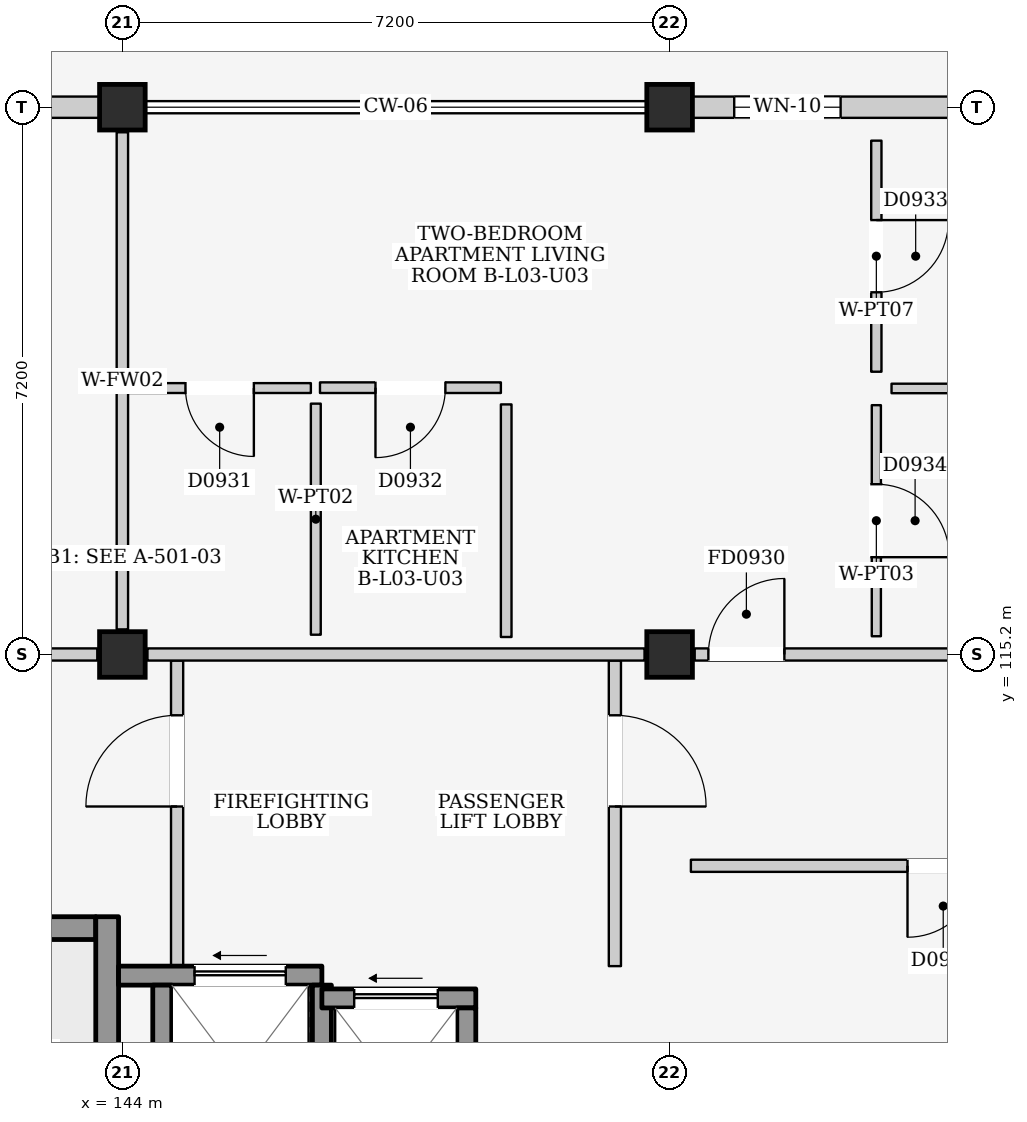
"""IFC4 building model, lengths in metres.
Left out: names, types, materials, properties, quantities, classifications, styles, units other than length and angle.
Written with IfcOpenShell. Run it as: python <this file> out.ifc"""

import sys

from ifc_helpers import new_model, si_unit, direction, frame, frame_2d, origin, origin_2d, place, context, subcontext, project, spatial, rectangle, extrude, element, fill, save


model = new_model("IFC4")
c1 = context("Model", 3, precision=1e-05, world=origin(), true_north=direction((0.0, 1.0)))
c2 = subcontext(c1, "Body", "Model", "MODEL_VIEW")
j1 = project(units=[si_unit("LENGTHUNIT", "METRE"), si_unit("PLANEANGLEUNIT", "RADIAN")], contexts=[c1])
p1 = place(None, origin())
s1 = spatial("IfcSite", under=j1, at=p1, CompositionType="ELEMENT")
p2 = place(p1, origin())
s2 = spatial("IfcBuilding", under=s1, at=p2, CompositionType="ELEMENT")
p3 = place(p2, frame((0.0, 0.0, 12.2)))
s3 = spatial("IfcBuildingStorey", under=s2, at=p3, CompositionType="ELEMENT", Elevation=12.2)
for number, where, z_axis, x_axis in (
    (1, (144.0, 115.2, 0.0), (0.0, 0.0, 1.0), (1.0, 0.0, 0.0)),
    (2, (144.0, 122.4, 0.0), (0.0, 0.0, 1.0), (1.0, 0.0, 0.0)),
    (3, (151.2, 115.2, 0.0), (0.0, 0.0, 1.0), (1.0, 0.0, 0.0)),
    (4, (151.2, 122.4, 0.0), (0.0, 0.0, 1.0), (1.0, 0.0, 0.0)),
):
    element("IfcColumn", number, at=place(p3, frame(where, z_axis=z_axis, x_axis=x_axis)), inside=s3, PredefinedType="COLUMN", context=c2, shape_type="SweptSolid", body=[
        extrude(rectangle(XDim=0.6, YDim=0.6, at=origin_2d()), origin(), (0.0, 0.0, 1.0), 3.2),
    ])
p4 = place(p3, frame((137.1, 122.4, 0.0), z_axis=(0.0, 0.0, 1.0), x_axis=(1.0, 0.0, 0.0)))
e5 = element("IfcWall", 5, at=p4, inside=s3, PredefinedType="ELEMENTEDWALL", context=c2, shape_type="SweptSolid", body=[
    extrude(rectangle(XDim=6.6, YDim=0.28, at=frame_2d((3.3, 0.0))), origin(), (0.0, 0.0, 1.0), 2.445),
])
p5 = place(p4, frame((3.85, 0.0, 0.0)))
e6 = element("IfcOpeningElement", 6, at=p5, cuts=e5, PredefinedType="OPENING", context=c2, shape_type="SweptSolid", body=[
    extrude(rectangle(XDim=1.4, YDim=2.1, at=frame_2d((0.7, 1.05))), frame((0.0, 0.155, 0.0), z_axis=(0.0, -1.0, 0.0), x_axis=(1.0, 0.0, 0.0)), (0.0, 0.0, 1.0), 0.31),
])
p6 = place(p4, frame((0.55, 0.0, 0.685)))
e7 = element("IfcOpeningElement", 7, at=p6, cuts=e5, PredefinedType="OPENING", context=c2, shape_type="SweptSolid", body=[
    extrude(rectangle(XDim=2.4, YDim=1.65, at=frame_2d((1.2, 0.825))), frame((0.0, 0.155, 0.0), z_axis=(0.0, -1.0, 0.0), x_axis=(1.0, 0.0, 0.0)), (0.0, 0.0, 1.0), 0.31),
])
p7 = place(p3, frame((151.5, 122.4, 0.0), z_axis=(0.0, 0.0, 1.0), x_axis=(1.0, 0.0, 0.0)))
e8 = element("IfcWall", 8, at=p7, inside=s3, PredefinedType="ELEMENTEDWALL", context=c2, shape_type="SweptSolid", body=[
    extrude(rectangle(XDim=6.6, YDim=0.28, at=frame_2d((3.3, 0.0))), origin(), (0.0, 0.0, 1.0), 2.445),
])
p8 = place(p7, frame((3.85, 0.0, 0.0)))
e9 = element("IfcOpeningElement", 9, at=p8, cuts=e8, PredefinedType="OPENING", context=c2, shape_type="SweptSolid", body=[
    extrude(rectangle(XDim=1.6, YDim=2.12, at=frame_2d((0.8, 1.06))), frame((0.0, 0.155, 0.0), z_axis=(0.0, -1.0, 0.0), x_axis=(1.0, 0.0, 0.0)), (0.0, 0.0, 1.0), 0.31),
])
p9 = place(p7, frame((0.55, 0.0, 0.9)))
e10 = element("IfcOpeningElement", 10, at=p9, cuts=e8, PredefinedType="OPENING", context=c2, shape_type="SweptSolid", body=[
    extrude(rectangle(XDim=1.4, YDim=1.2, at=frame_2d((0.7, 0.6))), frame((0.0, 0.155, 0.0), z_axis=(0.0, -1.0, 0.0), x_axis=(1.0, 0.0, 0.0)), (0.0, 0.0, 1.0), 0.31),
])
p10 = place(p3, frame((137.15, 111.6, 0.0), z_axis=(0.0, 0.0, 1.0), x_axis=(1.0, 0.0, 0.0)))
e11 = element("IfcWall", 11, at=p10, inside=s3, PredefinedType="SHEAR", context=c2, shape_type="SweptSolid", body=[
    extrude(rectangle(XDim=6.5, YDim=0.3, at=frame_2d((3.25, 0.0))), origin(), (0.0, 0.0, 1.0), 2.98),
])
p11 = place(p10, frame((0.18, 0.0, 0.0)))
e12 = element("IfcOpeningElement", 12, at=p11, cuts=e11, PredefinedType="OPENING", context=c2, shape_type="SweptSolid", body=[
    extrude(rectangle(XDim=1.15, YDim=2.2, at=frame_2d((0.575, 1.1))), frame((0.0, 0.165, 0.0), z_axis=(0.0, -1.0, 0.0), x_axis=(1.0, 0.0, 0.0)), (0.0, 0.0, 1.0), 0.33),
])
p12 = place(p3, frame((143.8, 108.15, 0.0), z_axis=(0.0, 0.0, 1.0), x_axis=(0.0, 1.0, 0.0)))
e13 = element("IfcWall", 13, at=p12, inside=s3, PredefinedType="SHEAR", context=c2, shape_type="SweptSolid", body=[
    extrude(rectangle(XDim=3.6, YDim=0.3, at=frame_2d((1.8, 0.0))), origin(), (0.0, 0.0, 1.0), 2.98),
])
p13 = place(p3, frame((144.72, 111.1, 0.0), z_axis=(0.0, 0.0, 1.0), x_axis=(0.0, 1.0, 0.0)))
e14 = element("IfcWall", 14, at=p13, inside=s3, PredefinedType="PARTITIONING", context=c2, shape_type="SweptSolid", body=[
    extrude(rectangle(XDim=4.02, YDim=0.16, at=frame_2d((2.01, 0.0))), origin(), (0.0, 0.0, 1.0), 2.98),
])
p14 = place(p13, frame((2.1, 0.0, 0.0)))
e15 = element("IfcOpeningElement", 15, at=p14, cuts=e14, PredefinedType="OPENING", context=c2, shape_type="SweptSolid", body=[
    extrude(rectangle(XDim=1.2, YDim=2.2, at=frame_2d((0.6, 1.1))), frame((0.0, 0.095, 0.0), z_axis=(0.0, -1.0, 0.0), x_axis=(1.0, 0.0, 0.0)), (0.0, 0.0, 1.0), 0.19),
])
p15 = place(p3, frame((150.48, 111.1, 0.0), z_axis=(0.0, 0.0, 1.0), x_axis=(0.0, 1.0, 0.0)))
e16 = element("IfcWall", 16, at=p15, inside=s3, PredefinedType="PARTITIONING", context=c2, shape_type="SweptSolid", body=[
    extrude(rectangle(XDim=4.02, YDim=0.16, at=frame_2d((2.01, 0.0))), origin(), (0.0, 0.0, 1.0), 2.98),
])
p16 = place(p15, frame((2.1, 0.0, 0.0)))
e17 = element("IfcOpeningElement", 17, at=p16, cuts=e16, PredefinedType="OPENING", context=c2, shape_type="SweptSolid", body=[
    extrude(rectangle(XDim=1.2, YDim=2.2, at=frame_2d((0.6, 1.1))), frame((0.0, 0.095, 0.0), z_axis=(0.0, -1.0, 0.0), x_axis=(1.0, 0.0, 0.0)), (0.0, 0.0, 1.0), 0.19),
])
p17 = place(p3, frame((143.95, 110.975, 0.0), z_axis=(0.0, 0.0, 1.0), x_axis=(1.0, 0.0, 0.0)))
e18 = element("IfcWall", 18, at=p17, inside=s3, PredefinedType="SHEAR", context=c2, shape_type="SweptSolid", body=[
    extrude(rectangle(XDim=2.675, YDim=0.25, at=frame_2d((1.337, 0.0))), origin(), (0.0, 0.0, 1.0), 2.98),
])
p18 = place(p17, frame((1.0, 0.0, 0.0)))
e19 = element("IfcOpeningElement", 19, at=p18, cuts=e18, PredefinedType="OPENING", context=c2, shape_type="SweptSolid", body=[
    extrude(rectangle(XDim=1.2, YDim=2.25, at=frame_2d((0.6, 1.125))), frame((0.0, 0.14, 0.0), z_axis=(0.0, -1.0, 0.0), x_axis=(1.0, 0.0, 0.0)), (0.0, 0.0, 1.0), 0.28),
])
for number, where, z_axis, x_axis in (
    (20, (144.525, 108.45, 0.0), (0.0, 0.0, 1.0), (0.0, 1.0, 0.0)),
    (21, (146.625, 108.45, 0.0), (0.0, 0.0, 1.0), (0.0, 1.0, 0.0)),
):
    element("IfcWall", number, at=place(p3, frame(where, z_axis=z_axis, x_axis=x_axis)), inside=s3, PredefinedType="SHEAR", context=c2, shape_type="SweptSolid", body=[
        extrude(rectangle(XDim=2.4, YDim=0.25, at=frame_2d((1.2, 0.0))), origin(), (0.0, 0.0, 1.0), 2.98),
    ])
p19 = place(p3, frame((146.625, 110.675, 0.0), z_axis=(0.0, 0.0, 1.0), x_axis=(1.0, 0.0, 0.0)))
e22 = element("IfcWall", 22, at=p19, inside=s3, PredefinedType="SHEAR", context=c2, shape_type="SweptSolid", body=[
    extrude(rectangle(XDim=2.025, YDim=0.25, at=frame_2d((1.012, 0.0))), origin(), (0.0, 0.0, 1.0), 2.98),
])
p20 = place(p19, frame((0.425, 0.0, 0.0)))
e23 = element("IfcOpeningElement", 23, at=p20, cuts=e22, PredefinedType="OPENING", context=c2, shape_type="SweptSolid", body=[
    extrude(rectangle(XDim=1.1, YDim=2.15, at=frame_2d((0.55, 1.075))), frame((0.0, 0.14, 0.0), z_axis=(0.0, -1.0, 0.0), x_axis=(1.0, 0.0, 0.0)), (0.0, 0.0, 1.0), 0.28),
])
p21 = place(p3, frame((148.525, 108.45, 0.0), z_axis=(0.0, 0.0, 1.0), x_axis=(0.0, 1.0, 0.0)))
e24 = element("IfcWall", 24, at=p21, inside=s3, PredefinedType="SHEAR", context=c2, shape_type="SweptSolid", body=[
    extrude(rectangle(XDim=2.1, YDim=0.25, at=frame_2d((1.05, 0.0))), origin(), (0.0, 0.0, 1.0), 2.98),
])
p22 = place(p3, frame((137.13, 115.2, 0.0), z_axis=(0.0, 0.0, 1.0), x_axis=(1.0, 0.0, 0.0)))
e25 = element("IfcWall", 25, at=p22, inside=s3, PredefinedType="PARTITIONING", context=c2, shape_type="SweptSolid", body=[
    extrude(rectangle(XDim=6.54, YDim=0.16, at=frame_2d((3.27, 0.0))), origin(), (0.0, 0.0, 1.0), 2.365),
])
p23 = place(p22, frame((4.12, 0.0, 0.0)))
e26 = element("IfcOpeningElement", 26, at=p23, cuts=e25, PredefinedType="OPENING", context=c2, shape_type="SweptSolid", body=[
    extrude(rectangle(XDim=1.0, YDim=2.15, at=frame_2d((0.5, 1.075))), frame((0.0, 0.095, 0.0), z_axis=(0.0, -1.0, 0.0), x_axis=(1.0, 0.0, 0.0)), (0.0, 0.0, 1.0), 0.19),
])
p24 = place(p3, frame((144.0, 115.53, 0.0), z_axis=(0.0, 0.0, 1.0), x_axis=(0.0, 1.0, 0.0)))
e27 = element("IfcWall", 27, at=p24, inside=s3, PredefinedType="PARTITIONING", context=c2, shape_type="SweptSolid", body=[
    extrude(rectangle(XDim=6.54, YDim=0.15, at=frame_2d((3.27, 0.0))), origin(), (0.0, 0.0, 1.0), 2.415),
])
p25 = place(p3, frame((144.33, 115.2, 0.0), z_axis=(0.0, 0.0, 1.0), x_axis=(1.0, 0.0, 0.0)))
e28 = element("IfcWall", 28, at=p25, inside=s3, PredefinedType="PARTITIONING", context=c2, shape_type="SweptSolid", body=[
    extrude(rectangle(XDim=6.54, YDim=0.16, at=frame_2d((3.27, 0.0))), origin(), (0.0, 0.0, 1.0), 2.365),
])
p26 = place(p3, frame((151.53, 115.2, 0.0), z_axis=(0.0, 0.0, 1.0), x_axis=(1.0, 0.0, 0.0)))
e29 = element("IfcWall", 29, at=p26, inside=s3, PredefinedType="PARTITIONING", context=c2, shape_type="SweptSolid", body=[
    extrude(rectangle(XDim=6.54, YDim=0.16, at=frame_2d((3.27, 0.0))), origin(), (0.0, 0.0, 1.0), 2.365),
])
p27 = place(p26, frame((0.18, 0.0, 0.0)))
e30 = element("IfcOpeningElement", 30, at=p27, cuts=e29, PredefinedType="OPENING", context=c2, shape_type="SweptSolid", body=[
    extrude(rectangle(XDim=1.0, YDim=2.15, at=frame_2d((0.5, 1.075))), frame((0.0, 0.095, 0.0), z_axis=(0.0, -1.0, 0.0), x_axis=(1.0, 0.0, 0.0)), (0.0, 0.0, 1.0), 0.19),
])
p28 = place(p3, frame((144.08, 118.705, 0.0), z_axis=(0.0, 0.0, 1.0), x_axis=(1.0, 0.0, 0.0)))
e31 = element("IfcWall", 31, at=p28, inside=s3, PredefinedType="PARTITIONING", context=c2, shape_type="SweptSolid", body=[
    extrude(rectangle(XDim=2.4, YDim=0.13, at=frame_2d((1.2, 0.0))), origin(), (0.0, 0.0, 1.0), 2.98),
])
p29 = place(p28, frame((0.75, 0.0, 0.0)))
e32 = element("IfcOpeningElement", 32, at=p29, cuts=e31, PredefinedType="OPENING", context=c2, shape_type="SweptSolid", body=[
    extrude(rectangle(XDim=0.9, YDim=2.1, at=frame_2d((0.45, 1.05))), frame((0.0, 0.08, 0.0), z_axis=(0.0, -1.0, 0.0), x_axis=(1.0, 0.0, 0.0)), (0.0, 0.0, 1.0), 0.16),
])
p30 = place(p3, frame((146.545, 115.46, 0.0), z_axis=(0.0, 0.0, 1.0), x_axis=(0.0, 1.0, 0.0)))
e33 = element("IfcWall", 33, at=p30, inside=s3, PredefinedType="PARTITIONING", context=c2, shape_type="SweptSolid", body=[
    extrude(rectangle(XDim=3.04, YDim=0.13, at=frame_2d((1.52, 0.0))), origin(), (0.0, 0.0, 1.0), 2.98),
])
p31 = place(p3, frame((146.6, 118.71, 0.0), z_axis=(0.0, 0.0, 1.0), x_axis=(1.0, 0.0, 0.0)))
e34 = element("IfcWall", 34, at=p31, inside=s3, PredefinedType="PARTITIONING", context=c2, shape_type="SweptSolid", body=[
    extrude(rectangle(XDim=2.38, YDim=0.14, at=frame_2d((1.19, 0.0))), origin(), (0.0, 0.0, 1.0), 2.98),
])
p32 = place(p31, frame((0.73, 0.0, 0.0)))
e35 = element("IfcOpeningElement", 35, at=p32, cuts=e34, PredefinedType="OPENING", context=c2, shape_type="SweptSolid", body=[
    extrude(rectangle(XDim=0.92, YDim=2.1, at=frame_2d((0.46, 1.05))), frame((0.0, 0.085, 0.0), z_axis=(0.0, -1.0, 0.0), x_axis=(1.0, 0.0, 0.0)), (0.0, 0.0, 1.0), 0.17),
])
p33 = place(p3, frame((149.05, 115.43, 0.0), z_axis=(0.0, 0.0, 1.0), x_axis=(0.0, 1.0, 0.0)))
e36 = element("IfcWall", 36, at=p33, inside=s3, PredefinedType="PARTITIONING", context=c2, shape_type="SweptSolid", body=[
    extrude(rectangle(XDim=3.06, YDim=0.14, at=frame_2d((1.53, 0.0))), origin(), (0.0, 0.0, 1.0), 2.98),
])
p34 = place(p3, frame((153.92, 118.92, 0.0), z_axis=(0.0, 0.0, 1.0), x_axis=(0.0, 1.0, 0.0)))
e37 = element("IfcWall", 37, at=p34, inside=s3, PredefinedType="PARTITIONING", context=c2, shape_type="SweptSolid", body=[
    extrude(rectangle(XDim=3.04, YDim=0.135, at=frame_2d((1.52, 0.0))), origin(), (0.0, 0.0, 1.0), 2.98),
])
p35 = place(p34, frame((1.045, 0.0, 0.0)))
e38 = element("IfcOpeningElement", 38, at=p35, cuts=e37, PredefinedType="OPENING", context=c2, shape_type="SweptSolid", body=[
    extrude(rectangle(XDim=0.95, YDim=2.15, at=frame_2d((0.475, 1.075))), frame((0.0, 0.083, 0.0), z_axis=(0.0, -1.0, 0.0), x_axis=(1.0, 0.0, 0.0)), (0.0, 0.0, 1.0), 0.165),
])
p36 = place(p3, frame((154.12, 118.7, 0.0), z_axis=(0.0, 0.0, 1.0), x_axis=(1.0, 0.0, 0.0)))
e39 = element("IfcWall", 39, at=p36, inside=s3, PredefinedType="PARTITIONING", context=c2, shape_type="SweptSolid", body=[
    extrude(rectangle(XDim=4.06, YDim=0.125, at=frame_2d((2.03, 0.0))), origin(), (0.0, 0.0, 1.0), 2.98),
])
p37 = place(p3, frame((153.92, 115.44, 0.0), z_axis=(0.0, 0.0, 1.0), x_axis=(0.0, 1.0, 0.0)))
e40 = element("IfcWall", 40, at=p37, inside=s3, PredefinedType="PARTITIONING", context=c2, shape_type="SweptSolid", body=[
    extrude(rectangle(XDim=3.04, YDim=0.12, at=frame_2d((1.52, 0.0))), origin(), (0.0, 0.0, 1.0), 2.98),
])
p38 = place(p37, frame((1.04, 0.0, 0.0)))
e41 = element("IfcOpeningElement", 41, at=p38, cuts=e40, PredefinedType="OPENING", context=c2, shape_type="SweptSolid", body=[
    extrude(rectangle(XDim=0.96, YDim=2.15, at=frame_2d((0.48, 1.075))), frame((0.0, 0.075, 0.0), z_axis=(0.0, -1.0, 0.0), x_axis=(1.0, 0.0, 0.0)), (0.0, 0.0, 1.0), 0.15),
])
p39 = place(p3, frame((151.48, 112.42, 0.0), z_axis=(0.0, 0.0, 1.0), x_axis=(1.0, 0.0, 0.0)))
e42 = element("IfcWall", 42, at=p39, inside=s3, PredefinedType="PARTITIONING", context=c2, shape_type="SweptSolid", body=[
    extrude(rectangle(XDim=6.64, YDim=0.16, at=frame_2d((3.32, 0.0))), origin(), (0.0, 0.0, 1.0), 2.98),
])
p40 = place(p39, frame((2.85, 0.0, 0.0)))
e43 = element("IfcOpeningElement", 43, at=p40, cuts=e42, PredefinedType="OPENING", context=c2, shape_type="SweptSolid", body=[
    extrude(rectangle(XDim=0.94, YDim=2.12, at=frame_2d((0.47, 1.06))), frame((0.0, 0.095, 0.0), z_axis=(0.0, -1.0, 0.0), x_axis=(1.0, 0.0, 0.0)), (0.0, 0.0, 1.0), 0.19),
])
p41 = place(p9, origin())
e44 = element("IfcWindow", 44, at=p41, inside=s3, PartitioningType="DOUBLE_PANEL_HORIZONTAL", PredefinedType="WINDOW", context=c2, shape_type="SweptSolid", body=[
    extrude(rectangle(XDim=1.4, YDim=1.2, at=frame_2d((0.7, 0.6))), frame((0.0, 0.03, 0.0), z_axis=(0.0, -1.0, 0.0), x_axis=(1.0, 0.0, 0.0)), (0.0, 0.0, 1.0), 0.06),
])
fill(e10, e44)
p42 = place(p14, origin())
e45 = element("IfcDoor", 45, at=p42, inside=s3, OperationType="SINGLE_SWING_LEFT", PredefinedType="DOOR", context=c2, shape_type="SweptSolid", body=[
    extrude(rectangle(XDim=1.2, YDim=2.2, at=frame_2d((0.6, 1.1))), frame((0.0, 0.025, 0.0), z_axis=(0.0, -1.0, 0.0), x_axis=(1.0, 0.0, 0.0)), (0.0, 0.0, 1.0), 0.05),
])
fill(e15, e45)
p43 = place(p16, frame((1.2, 0.0, 0.0), z_axis=(0.0, 0.0, 1.0), x_axis=(-1.0, 0.0, 0.0)))
e46 = element("IfcDoor", 46, at=p43, inside=s3, OperationType="SINGLE_SWING_RIGHT", PredefinedType="DOOR", context=c2, shape_type="SweptSolid", body=[
    extrude(rectangle(XDim=1.2, YDim=2.2, at=frame_2d((0.6, 1.1))), frame((0.0, 0.025, 0.0), z_axis=(0.0, -1.0, 0.0), x_axis=(1.0, 0.0, 0.0)), (0.0, 0.0, 1.0), 0.05),
])
fill(e17, e46)
p44 = place(p18, origin())
e47 = element("IfcDoor", 47, at=p44, inside=s3, OperationType="SLIDING_TO_LEFT", PredefinedType="DOOR", context=c2, shape_type="SweptSolid", body=[
    extrude(rectangle(XDim=1.2, YDim=2.25, at=frame_2d((0.6, 1.125))), frame((0.0, 0.025, 0.0), z_axis=(0.0, -1.0, 0.0), x_axis=(1.0, 0.0, 0.0)), (0.0, 0.0, 1.0), 0.05),
])
fill(e19, e47)
p45 = place(p20, origin())
e48 = element("IfcDoor", 48, at=p45, inside=s3, OperationType="SLIDING_TO_LEFT", PredefinedType="DOOR", context=c2, shape_type="SweptSolid", body=[
    extrude(rectangle(XDim=1.1, YDim=2.15, at=frame_2d((0.55, 1.075))), frame((0.0, 0.025, 0.0), z_axis=(0.0, -1.0, 0.0), x_axis=(1.0, 0.0, 0.0)), (0.0, 0.0, 1.0), 0.05),
])
fill(e23, e48)
p46 = place(p27, origin())
e49 = element("IfcDoor", 49, at=p46, inside=s3, OperationType="SINGLE_SWING_RIGHT", PredefinedType="DOOR", context=c2, shape_type="SweptSolid", body=[
    extrude(rectangle(XDim=1.0, YDim=2.15, at=frame_2d((0.5, 1.075))), frame((0.0, 0.025, 0.0), z_axis=(0.0, -1.0, 0.0), x_axis=(1.0, 0.0, 0.0)), (0.0, 0.0, 1.0), 0.05),
])
fill(e30, e49)
p47 = place(p29, frame((0.9, 0.0, 0.0), z_axis=(0.0, 0.0, 1.0), x_axis=(-1.0, 0.0, 0.0)))
e50 = element("IfcDoor", 50, at=p47, inside=s3, OperationType="SINGLE_SWING_LEFT", PredefinedType="DOOR", context=c2, shape_type="SweptSolid", body=[
    extrude(rectangle(XDim=0.9, YDim=2.1, at=frame_2d((0.45, 1.05))), frame((0.0, 0.025, 0.0), z_axis=(0.0, -1.0, 0.0), x_axis=(1.0, 0.0, 0.0)), (0.0, 0.0, 1.0), 0.05),
])
fill(e32, e50)
p48 = place(p32, frame((0.92, 0.0, 0.0), z_axis=(0.0, 0.0, 1.0), x_axis=(-1.0, 0.0, 0.0)))
e51 = element("IfcDoor", 51, at=p48, inside=s3, OperationType="SINGLE_SWING_RIGHT", PredefinedType="DOOR", context=c2, shape_type="SweptSolid", body=[
    extrude(rectangle(XDim=0.92, YDim=2.1, at=frame_2d((0.46, 1.05))), frame((0.0, 0.025, 0.0), z_axis=(0.0, -1.0, 0.0), x_axis=(1.0, 0.0, 0.0)), (0.0, 0.0, 1.0), 0.05),
])
fill(e35, e51)
p49 = place(p35, frame((0.95, 0.0, 0.0), z_axis=(0.0, 0.0, 1.0), x_axis=(-1.0, 0.0, 0.0)))
e52 = element("IfcDoor", 52, at=p49, inside=s3, OperationType="SINGLE_SWING_LEFT", PredefinedType="DOOR", context=c2, shape_type="SweptSolid", body=[
    extrude(rectangle(XDim=0.95, YDim=2.15, at=frame_2d((0.475, 1.075))), frame((0.0, 0.025, 0.0), z_axis=(0.0, -1.0, 0.0), x_axis=(1.0, 0.0, 0.0)), (0.0, 0.0, 1.0), 0.05),
])
fill(e38, e52)
p50 = place(p38, frame((0.96, 0.0, 0.0), z_axis=(0.0, 0.0, 1.0), x_axis=(-1.0, 0.0, 0.0)))
e53 = element("IfcDoor", 53, at=p50, inside=s3, OperationType="SINGLE_SWING_RIGHT", PredefinedType="DOOR", context=c2, shape_type="SweptSolid", body=[
    extrude(rectangle(XDim=0.96, YDim=2.15, at=frame_2d((0.48, 1.075))), frame((0.0, 0.025, 0.0), z_axis=(0.0, -1.0, 0.0), x_axis=(1.0, 0.0, 0.0)), (0.0, 0.0, 1.0), 0.05),
])
fill(e41, e53)
p51 = place(p40, frame((0.94, 0.0, 0.0), z_axis=(0.0, 0.0, 1.0), x_axis=(-1.0, 0.0, 0.0)))
e54 = element("IfcDoor", 54, at=p51, inside=s3, OperationType="SINGLE_SWING_RIGHT", PredefinedType="DOOR", context=c2, shape_type="SweptSolid", body=[
    extrude(rectangle(XDim=0.94, YDim=2.12, at=frame_2d((0.47, 1.06))), frame((0.0, 0.025, 0.0), z_axis=(0.0, -1.0, 0.0), x_axis=(1.0, 0.0, 0.0)), (0.0, 0.0, 1.0), 0.05),
])
fill(e43, e54)
save(model, sys.argv[1])
